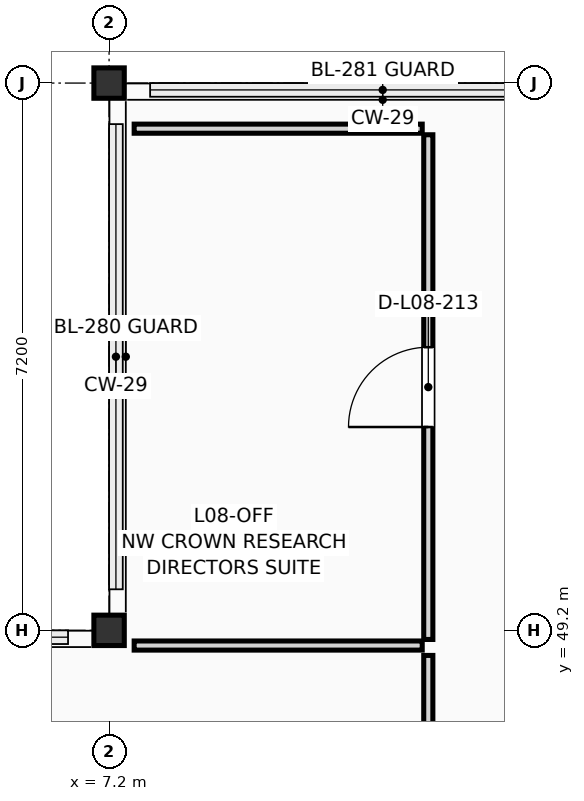
"""IFC4 building model, lengths in metres.
Left out: names, types, materials, properties, quantities, classifications, styles, units other than length and angle.
Written with IfcOpenShell. Run it as: python <this file> out.ifc"""

import sys

from ifc_helpers import new_model, si_unit, direction, frame, frame_2d, origin, origin_2d, place, context, subcontext, project, spatial, rectangle, extrude, element, fill, save


model = new_model("IFC4")
c1 = context("Model", 3, precision=1e-05, world=origin(), true_north=direction((0.0, 1.0)))
c2 = subcontext(c1, "Body", "Model", "MODEL_VIEW")
j1 = project(units=[si_unit("LENGTHUNIT", "METRE"), si_unit("PLANEANGLEUNIT", "RADIAN")], contexts=[c1])
p1 = place(None, origin())
s1 = spatial("IfcSite", under=j1, at=p1, CompositionType="ELEMENT")
p2 = place(p1, origin())
s2 = spatial("IfcBuilding", under=s1, at=p2, CompositionType="ELEMENT")
p3 = place(p2, frame((0.0, 0.0, 29.7)))
s3 = spatial("IfcBuildingStorey", under=s2, at=p3, CompositionType="ELEMENT", Elevation=29.7)
for number, where, z_axis, x_axis in (
    (1, (7.2, 49.2, 0.0), (0.0, 0.0, 1.0), (1.0, 0.0, 0.0)),
    (2, (7.2, 56.4, 0.0), (0.0, 0.0, 1.0), (1.0, 0.0, 0.0)),
):
    element("IfcColumn", number, at=place(p3, frame(where, z_axis=z_axis, x_axis=x_axis)), inside=s3, PredefinedType="COLUMN", context=c2, shape_type="SweptSolid", body=[
        extrude(rectangle(XDim=0.4, YDim=0.4, at=origin_2d()), origin(), (0.0, 0.0, 1.0), 3.6),
    ])
p4 = place(p3, frame((7.53, 49.0, 0.0), z_axis=(0.0, 0.0, 1.0), x_axis=(1.0, 0.0, 0.0)))
e3 = element("IfcWall", 3, at=p4, inside=s3, PredefinedType="PARTITIONING", context=c2, shape_type="SweptSolid", body=[
    extrude(rectangle(XDim=3.79, YDim=0.12, at=frame_2d((1.895, 0.0))), origin(), (0.0, 0.0, 1.0), 2.701),
])
p5 = place(p3, frame((11.4, 49.08, 0.0), z_axis=(0.0, 0.0, 1.0), x_axis=(0.0, 1.0, 0.0)))
e4 = element("IfcWall", 4, at=p5, inside=s3, PredefinedType="PARTITIONING", context=c2, shape_type="SweptSolid", body=[
    extrude(rectangle(XDim=6.64, YDim=0.12, at=frame_2d((3.32, 0.0))), origin(), (0.0, 0.0, 1.0), 3.385),
])
p6 = place(p5, frame((2.795, 0.0, 0.0)))
e5 = element("IfcOpeningElement", 5, at=p6, cuts=e4, PredefinedType="OPENING", context=c2, shape_type="SweptSolid", body=[
    extrude(rectangle(XDim=1.05, YDim=2.18, at=frame_2d((0.525, 1.09))), frame((0.0, 0.072, 0.0), z_axis=(0.0, -1.0, 0.0), x_axis=(1.0, 0.0, 0.0)), (0.0, 0.0, 1.0), 0.144),
])
p7 = place(p3, frame((7.53, 55.8, 0.0), z_axis=(0.0, 0.0, 1.0), x_axis=(1.0, 0.0, 0.0)))
e6 = element("IfcWall", 6, at=p7, inside=s3, PredefinedType="PARTITIONING", context=c2, shape_type="SweptSolid", body=[
    extrude(rectangle(XDim=3.79, YDim=0.12, at=frame_2d((1.895, 0.0))), origin(), (0.0, 0.0, 1.0), 3.385),
])
p8 = place(p3, frame((11.4, 21.88, 0.0), z_axis=(0.0, 0.0, 1.0), x_axis=(0.0, 1.0, 0.0)))
e7 = element("IfcWall", 7, at=p8, inside=s3, PredefinedType="PARTITIONING", context=c2, shape_type="SweptSolid", body=[
    extrude(rectangle(XDim=26.99, YDim=0.12, at=frame_2d((13.495, 0.0))), origin(), (0.0, 0.0, 1.0), 3.385),
])
p9 = place(p8, frame((12.895, 0.0, 0.0)))
e8 = element("IfcOpeningElement", 8, at=p9, cuts=e7, PredefinedType="OPENING", context=c2, shape_type="SweptSolid", body=[
    extrude(rectangle(XDim=1.2, YDim=2.15, at=frame_2d((0.6, 1.075))), frame((0.0, 0.072, 0.0), z_axis=(0.0, -1.0, 0.0), x_axis=(1.0, 0.0, 0.0)), (0.0, 0.0, 1.0), 0.144),
])
p10 = place(p6, origin())
e9 = element("IfcDoor", 9, at=p10, inside=s3, OperationType="SINGLE_SWING_LEFT", PredefinedType="DOOR", context=c2, shape_type="SweptSolid", body=[
    extrude(rectangle(XDim=1.05, YDim=2.18, at=frame_2d((0.525, 1.09))), frame((0.0, 0.025, 0.0), z_axis=(0.0, -1.0, 0.0), x_axis=(1.0, 0.0, 0.0)), (0.0, 0.0, 1.0), 0.05),
])
fill(e5, e9)
save(model, sys.argv[1])
